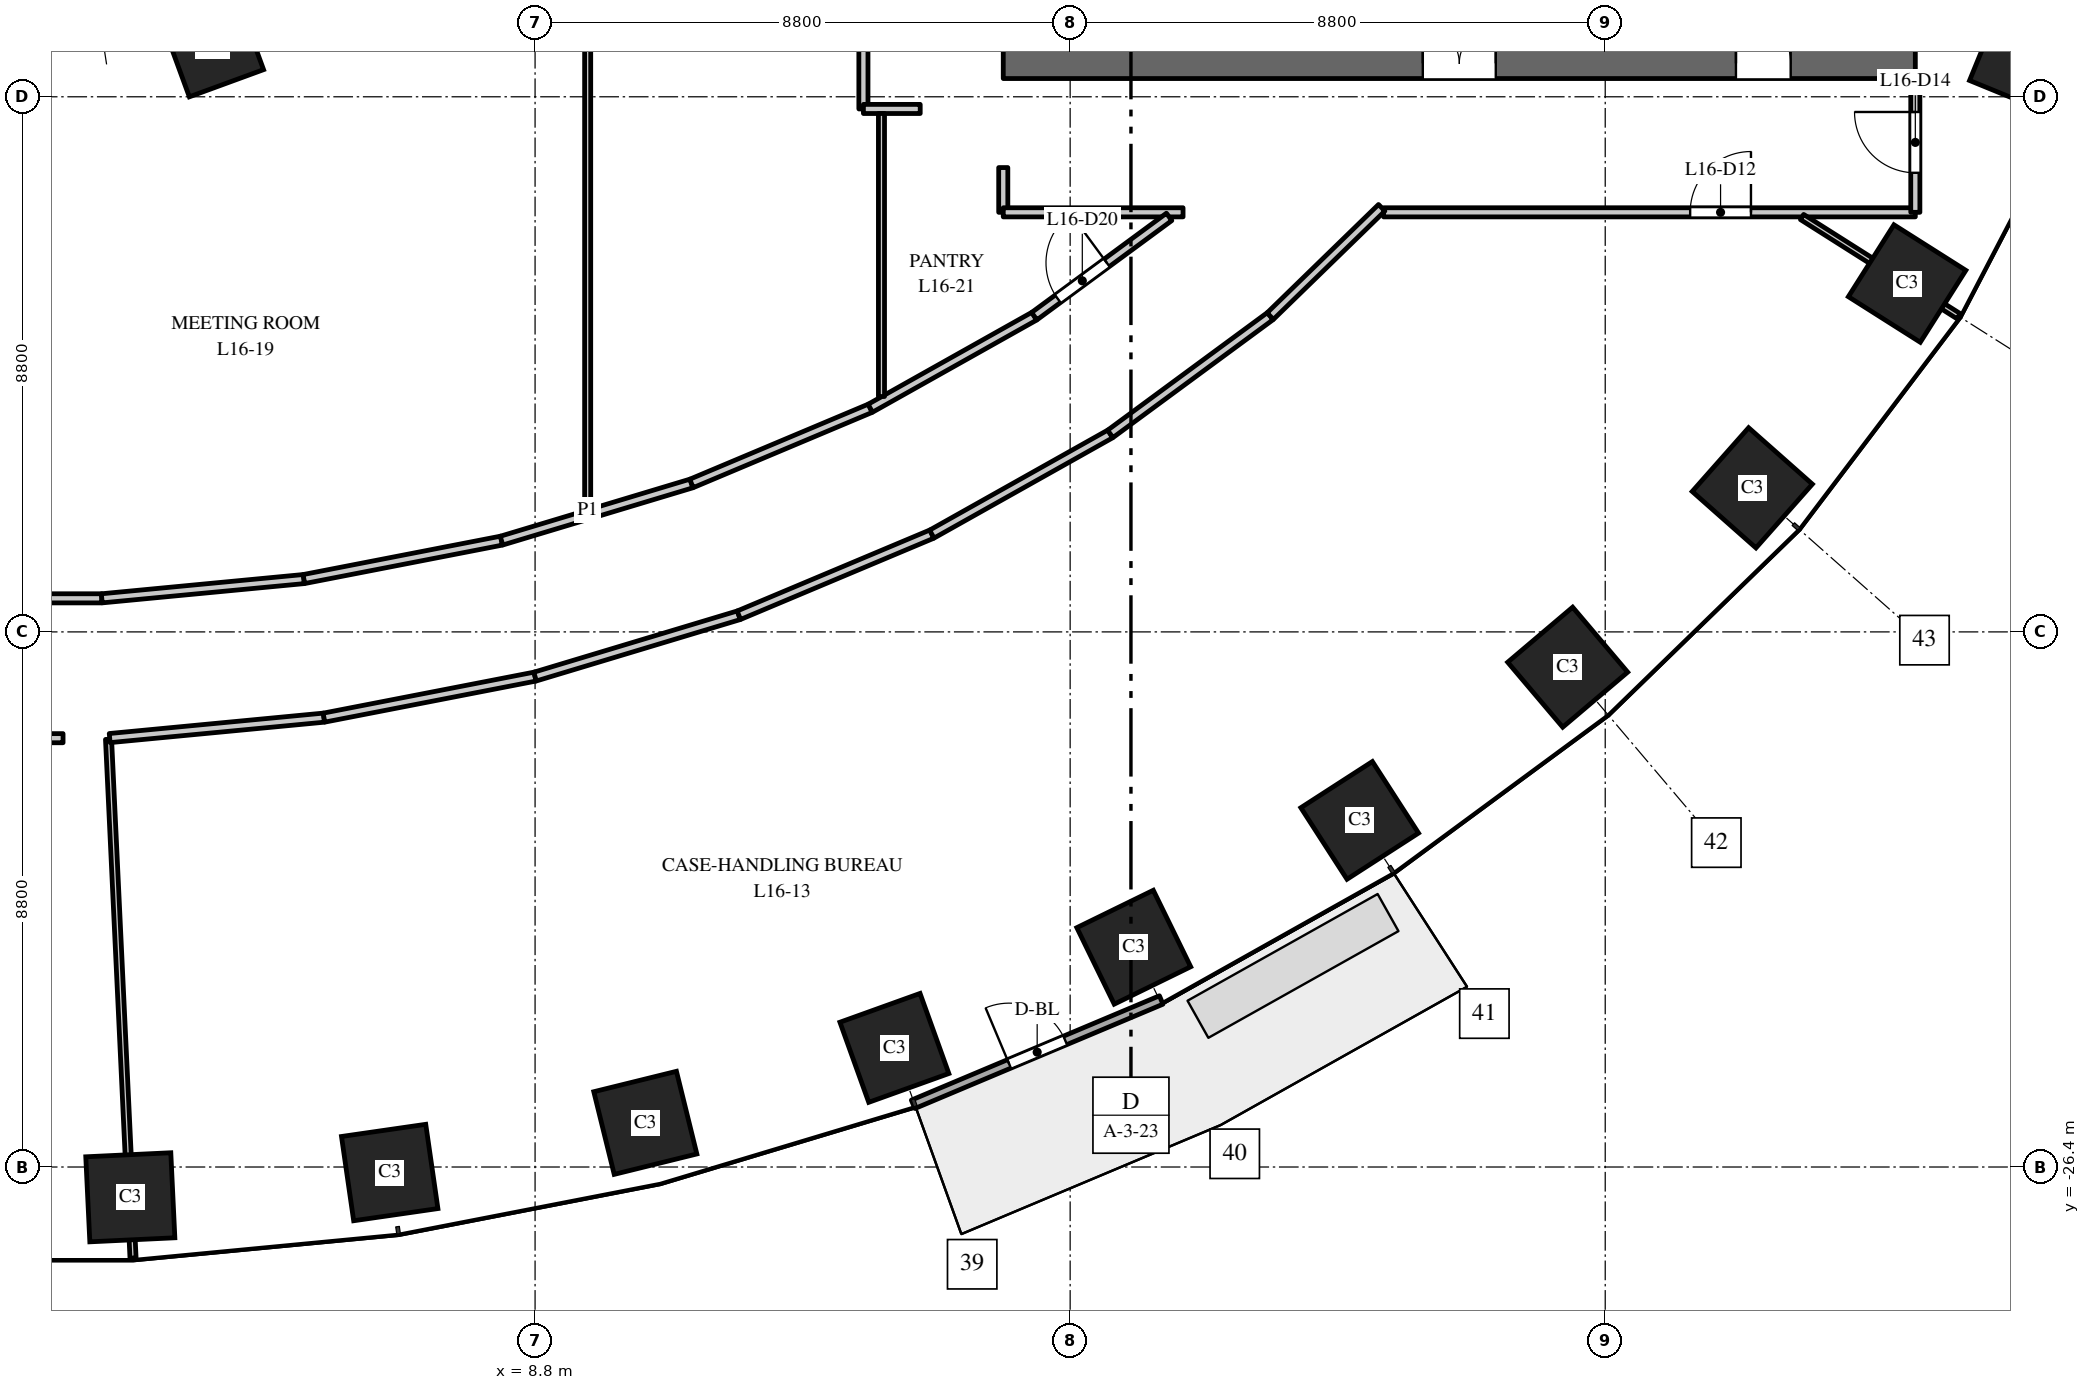
"""IFC4 building model, lengths in metres.
Left out: names, types, materials, properties, quantities, classifications, styles, units other than length and angle.
Written with IfcOpenShell. Run it as: python <this file> out.ifc"""

import sys

from ifc_helpers import new_model, si_unit, direction, frame, frame_2d, origin, origin_2d, place, context, subcontext, project, spatial, rectangle, extrude, element, fill, save


model = new_model("IFC4")
c1 = context("Model", 3, precision=1e-05, world=origin(), true_north=direction((0.0, 1.0)))
c2 = subcontext(c1, "Body", "Model", "MODEL_VIEW")
j1 = project(units=[si_unit("LENGTHUNIT", "METRE"), si_unit("PLANEANGLEUNIT", "RADIAN")], contexts=[c1])
p1 = place(None, origin())
s1 = spatial("IfcSite", under=j1, at=p1, CompositionType="ELEMENT")
p2 = place(p1, origin())
s2 = spatial("IfcBuilding", under=s1, at=p2, CompositionType="ELEMENT")
p3 = place(p2, frame((0.0, 0.0, 74.5)))
s3 = spatial("IfcBuildingStorey", under=s2, at=p3, CompositionType="ELEMENT", Elevation=74.5)
for number, where, z_axis, x_axis in (
    (1, (2.143, -26.898, 0.0), (0.0, 0.0, 1.0), (0.999, 0.048, 0.0)),
    (2, (6.409, -26.491, 0.0), (0.0, 0.0, 1.0), (0.99, 0.143, 0.0)),
    (3, (10.613, -25.674, 0.0), (0.0, 0.0, 1.0), (0.971, 0.24, 0.0)),
    (4, (14.709, -24.441, 0.0), (0.0, 0.0, 1.0), (0.941, 0.338, 0.0)),
    (5, (18.646, -22.785, 0.0), (0.0, 0.0, 1.0), (0.898, 0.439, 0.0)),
    (6, (22.362, -20.7, 0.0), (0.0, 0.0, 1.0), (0.84, 0.542, 0.0)),
    (7, (25.783, -18.18, 0.0), (0.0, 0.0, 1.0), (0.763, 0.646, 0.0)),
    (8, (28.819, -15.23, 0.0), (0.0, 0.0, 1.0), (0.663, 0.749, 0.0)),
    (9, (31.365, -11.871, 0.0), (0.0, 0.0, 1.0), (0.535, 0.845, 0.0)),
    (10, (33.305, -8.149, 0.0), (0.0, 0.0, 1.0), (0.379, 0.925, 0.0)),
):
    element("IfcColumn", number, at=place(p3, frame(where, z_axis=z_axis, x_axis=x_axis)), inside=s3, PredefinedType="COLUMN", context=c2, shape_type="SweptSolid", body=[
        extrude(rectangle(XDim=1.4, YDim=1.4, at=origin_2d()), origin(), (0.0, 0.0, 1.0), 4.0),
    ])
p4 = place(p3, frame((3.501, -7.967, 0.0), z_axis=(0.0, 0.0, 1.0), x_axis=(0.939019578916, 0.343863679984, 0.0)))
e11 = element("IfcColumn", 11, at=p4, inside=s3, PredefinedType="COLUMN", context=c2, shape_type="SweptSolid", body=[
    extrude(rectangle(XDim=1.3, YDim=1.3, at=origin_2d()), origin(), (0.0, 0.0, 1.0), 4.0),
])
p5 = place(p3, frame((16.5, -8.25, 0.0), z_axis=(0.0, 0.0, 1.0), x_axis=(1.0, 0.0, 0.0)))
e12 = element("IfcWall", 12, at=p5, inside=s3, PredefinedType="SHEAR", context=c2, shape_type="SweptSolid", body=[
    extrude(rectangle(XDim=15.0, YDim=0.5, at=frame_2d((7.5, 0.0))), origin(), (0.0, 0.0, 1.0), 3.7),
])
p6 = place(p5, frame((6.9, 0.0, 0.0)))
e13 = element("IfcOpeningElement", 13, at=p6, cuts=e12, PredefinedType="OPENING", context=c2, shape_type="SweptSolid", body=[
    extrude(rectangle(XDim=1.2, YDim=2.1, at=frame_2d((0.6, 1.05))), frame((0.0, 0.26, 0.0), z_axis=(0.0, -1.0, 0.0), x_axis=(1.0, 0.0, 0.0)), (0.0, 0.0, 1.0), 0.52),
])
p7 = place(p5, frame((12.05, 0.0, 0.0)))
e14 = element("IfcOpeningElement", 14, at=p7, cuts=e12, PredefinedType="OPENING", context=c2, shape_type="SweptSolid", body=[
    extrude(rectangle(XDim=0.9, YDim=2.1, at=frame_2d((0.45, 1.05))), frame((0.0, 0.26, 0.0), z_axis=(0.0, -1.0, 0.0), x_axis=(1.0, 0.0, 0.0)), (0.0, 0.0, 1.0), 0.52),
])
p8 = place(p3, frame((15.018, -25.369, 0.0), z_axis=(0.0, 0.0, 1.0), x_axis=(0.921816985161, 0.387625393736, 0.0)))
e15 = element("IfcWall", 15, at=p8, inside=s3, PredefinedType="STANDARD", context=c2, shape_type="SweptSolid", body=[
    extrude(rectangle(XDim=4.426, YDim=0.15, at=frame_2d((2.213, 0.0))), origin(), (0.0, 0.0, 1.0), 3.7),
])
p9 = place(p8, frame((1.713, 0.0, 0.0)))
e16 = element("IfcOpeningElement", 16, at=p9, cuts=e15, PredefinedType="OPENING", context=c2, shape_type="SweptSolid", body=[
    extrude(rectangle(XDim=1.0, YDim=2.4, at=frame_2d((0.5, 1.2))), frame((0.0, 0.085, 0.0), z_axis=(0.0, -1.0, 0.0), x_axis=(1.0, 0.0, 0.0)), (0.0, 0.0, 1.0), 0.17),
])
p10 = place(p3, frame((-1.784, -19.348, 0.0), z_axis=(0.0, 0.0, 1.0), x_axis=(1.0, 0.0, 0.0)))
e17 = element("IfcWall", 17, at=p10, inside=s3, PredefinedType="PARTITIONING", context=c2, shape_type="SweptSolid", body=[
    extrude(rectangle(XDim=2.821, YDim=0.15, at=frame_2d((1.411, 0.0))), origin(), (0.0, 0.0, 1.0), 2.85),
])
p11 = place(p3, frame((0.0, -17.048, 0.0), z_axis=(0.0, 0.0, 1.0), x_axis=(1.0, 0.0, 0.0)))
e18 = element("IfcWall", 18, at=p11, inside=s3, PredefinedType="PARTITIONING", context=c2, shape_type="SweptSolid", body=[
    extrude(rectangle(XDim=1.674, YDim=0.15, at=frame_2d((0.837, 0.0))), origin(), (0.0, 0.0, 1.0), 3.7),
])
p12 = place(p3, frame((1.674, -17.048, 0.0), z_axis=(0.0, 0.0, 1.0), x_axis=(0.995479356205, 0.094978162593, 0.0)))
e19 = element("IfcWall", 19, at=p12, inside=s3, PredefinedType="PARTITIONING", context=c2, shape_type="SweptSolid", body=[
    extrude(rectangle(XDim=3.339, YDim=0.15, at=frame_2d((1.669, 0.0))), origin(), (0.0, 0.0, 1.0), 2.85),
])
p13 = place(p3, frame((1.785, -19.366, 0.0), z_axis=(0.0, 0.0, 1.0), x_axis=(0.047190335266, -0.998885915537, 0.0)))
e20 = element("IfcWall", 20, at=p13, inside=s3, PredefinedType="PARTITIONING", context=c2, shape_type="SweptSolid", body=[
    extrude(rectangle(XDim=8.542, YDim=0.1, at=frame_2d((4.271, 0.0))), origin(), (0.0, 0.0, 1.0), 2.85),
])
p14 = place(p3, frame((1.804, -19.346, 0.0), z_axis=(0.0, 0.0, 1.0), x_axis=(0.99548678928, 0.094900223226, 0.0)))
e21 = element("IfcWall", 21, at=p14, inside=s3, PredefinedType="PARTITIONING", context=c2, shape_type="SweptSolid", body=[
    extrude(rectangle(XDim=3.54, YDim=0.15, at=frame_2d((1.77, 0.0))), origin(), (0.0, 0.0, 1.0), 2.85),
])
p15 = place(p3, frame((4.998, -16.731, 0.0), z_axis=(0.0, 0.0, 1.0), x_axis=(0.981621529558, 0.190838079815, 0.0)))
e22 = element("IfcWall", 22, at=p15, inside=s3, PredefinedType="PARTITIONING", context=c2, shape_type="SweptSolid", body=[
    extrude(rectangle(XDim=3.311, YDim=0.15, at=frame_2d((1.655, 0.0))), origin(), (0.0, 0.0, 1.0), 3.7),
])
p16 = place(p3, frame((5.328, -19.01, 0.0), z_axis=(0.0, 0.0, 1.0), x_axis=(0.981620418387, 0.190843795306, 0.0)))
e23 = element("IfcWall", 23, at=p16, inside=s3, PredefinedType="PARTITIONING", context=c2, shape_type="SweptSolid", body=[
    extrude(rectangle(XDim=3.537, YDim=0.15, at=frame_2d((1.769, 0.0))), origin(), (0.0, 0.0, 1.0), 3.7),
])
p17 = place(p3, frame((8.248, -16.099, 0.0), z_axis=(0.0, 0.0, 1.0), x_axis=(0.95757464185, 0.28818536619, 0.0)))
e24 = element("IfcWall", 24, at=p17, inside=s3, PredefinedType="PARTITIONING", context=c2, shape_type="SweptSolid", body=[
    extrude(rectangle(XDim=3.262, YDim=0.15, at=frame_2d((1.631, 0.0))), origin(), (0.0, 0.0, 1.0), 2.85),
])
p18 = place(p3, frame((8.8, -18.335, 0.0), z_axis=(0.0, 0.0, 1.0), x_axis=(0.957528149021, 0.288339806186, 0.0)))
e25 = element("IfcWall", 25, at=p18, inside=s3, PredefinedType="PARTITIONING", context=c2, shape_type="SweptSolid", body=[
    extrude(rectangle(XDim=3.5, YDim=0.15, at=frame_2d((1.75, 0.0))), origin(), (0.0, 0.0, 1.0), 2.85),
])
p19 = place(p3, frame((9.665, -15.591, 0.0), z_axis=(0.0, 0.0, 1.0), x_axis=(0.0, 1.0, 0.0)))
e26 = element("IfcWall", 26, at=p19, inside=s3, PredefinedType="PARTITIONING", context=c2, shape_type="SweptSolid", body=[
    extrude(rectangle(XDim=31.182, YDim=0.1, at=frame_2d((15.591, 0.0))), origin(), (0.0, 0.0, 1.0), 2.75),
])
p20 = place(p3, frame((11.372, -15.159, 0.0), z_axis=(0.0, 0.0, 1.0), x_axis=(0.921799502591, 0.387666966638, 0.0)))
e27 = element("IfcWall", 27, at=p20, inside=s3, PredefinedType="PARTITIONING", context=c2, shape_type="SweptSolid", body=[
    extrude(rectangle(XDim=3.19, YDim=0.15, at=frame_2d((1.595, 0.0))), origin(), (0.0, 0.0, 1.0), 3.7),
])
p21 = place(p3, frame((12.151, -17.326, 0.0), z_axis=(0.0, 0.0, 1.0), x_axis=(0.921891448612, 0.387448263612, 0.0)))
e28 = element("IfcWall", 28, at=p21, inside=s3, PredefinedType="PARTITIONING", context=c2, shape_type="SweptSolid", body=[
    extrude(rectangle(XDim=3.443, YDim=0.15, at=frame_2d((1.722, 0.0))), origin(), (0.0, 0.0, 1.0), 3.7),
])
p22 = place(p3, frame((14.2, -9.0, 0.0), z_axis=(0.0, 0.0, 1.0), x_axis=(0.0, 1.0, 0.0)))
e29 = element("IfcWall", 29, at=p22, inside=s3, PredefinedType="PARTITIONING", context=c2, shape_type="SweptSolid", body=[
    extrude(rectangle(XDim=18.0, YDim=0.15, at=frame_2d((9.0, 0.0))), origin(), (0.0, 0.0, 1.0), 2.75),
])
p23 = place(p22, frame((16.35, 0.0, 0.0)))
e30 = element("IfcOpeningElement", 30, at=p23, cuts=e29, PredefinedType="OPENING", context=c2, shape_type="SweptSolid", body=[
    extrude(rectangle(XDim=1.0, YDim=2.1, at=frame_2d((0.5, 1.05))), frame((0.0, 0.085, 0.0), z_axis=(0.0, -1.0, 0.0), x_axis=(1.0, 0.0, 0.0)), (0.0, 0.0, 1.0), 0.17),
])
p24 = place(p3, frame((14.2, -9.0, 0.0), z_axis=(0.0, 0.0, 1.0), x_axis=(1.0, 0.0, 0.0)))
e31 = element("IfcWall", 31, at=p24, inside=s3, PredefinedType="PARTITIONING", context=c2, shape_type="SweptSolid", body=[
    extrude(rectangle(XDim=0.934, YDim=0.15, at=frame_2d((0.467, 0.0))), origin(), (0.0, 0.0, 1.0), 3.7),
])
p25 = place(p3, frame((14.313, -13.922, 0.0), z_axis=(0.0, 0.0, 1.0), x_axis=(0.871977874087, 0.489545286059, 0.0)))
e32 = element("IfcWall", 32, at=p25, inside=s3, PredefinedType="PARTITIONING", context=c2, shape_type="SweptSolid", body=[
    extrude(rectangle(XDim=3.093, YDim=0.15, at=frame_2d((1.546, 0.0))), origin(), (0.0, 0.0, 1.0), 3.7),
])
p26 = place(p3, frame((14.497, -13.729, 0.0), z_axis=(0.0, 0.0, 1.0), x_axis=(0.0, 1.0, 0.0)))
e33 = element("IfcWall", 33, at=p26, inside=s3, PredefinedType="PARTITIONING", context=c2, shape_type="SweptSolid", body=[
    extrude(rectangle(XDim=4.654, YDim=0.1, at=frame_2d((2.327, 0.0))), origin(), (0.0, 0.0, 1.0), 3.7),
])
p27 = place(p3, frame((15.325, -15.992, 0.0), z_axis=(0.0, 0.0, 1.0), x_axis=(0.871958798398, 0.489579262118, 0.0)))
e34 = element("IfcWall", 34, at=p27, inside=s3, PredefinedType="PARTITIONING", context=c2, shape_type="SweptSolid", body=[
    extrude(rectangle(XDim=3.366, YDim=0.15, at=frame_2d((1.683, 0.0))), origin(), (0.0, 0.0, 1.0), 3.7),
])
p28 = place(p3, frame((16.5, -10.7, 0.0), z_axis=(0.0, 0.0, 1.0), x_axis=(0.0, 1.0, 0.0)))
e35 = element("IfcWall", 35, at=p28, inside=s3, PredefinedType="PARTITIONING", context=c2, shape_type="SweptSolid", body=[
    extrude(rectangle(XDim=0.736, YDim=0.15, at=frame_2d((0.368, 0.0))), origin(), (0.0, 0.0, 1.0), 3.7),
])
p29 = place(p3, frame((16.5, -10.7, 0.0), z_axis=(0.0, 0.0, 1.0), x_axis=(1.0, 0.0, 0.0)))
e36 = element("IfcWall", 36, at=p29, inside=s3, PredefinedType="PARTITIONING", context=c2, shape_type="SweptSolid", body=[
    extrude(rectangle(XDim=2.957, YDim=0.15, at=frame_2d((1.479, 0.0))), origin(), (0.0, 0.0, 1.0), 3.7),
])
p30 = place(p3, frame((17.01, -12.408, 0.0), z_axis=(0.0, 0.0, 1.0), x_axis=(0.805276342361, 0.592899664728, 0.0)))
e37 = element("IfcWall", 37, at=p30, inside=s3, PredefinedType="PARTITIONING", context=c2, shape_type="SweptSolid", body=[
    extrude(rectangle(XDim=2.754, YDim=0.15, at=frame_2d((1.377, 0.0))), origin(), (0.0, 0.0, 1.0), 3.7),
])
p31 = place(p30, frame((0.481, 0.0, 0.0)))
e38 = element("IfcOpeningElement", 38, at=p31, cuts=e37, PredefinedType="OPENING", context=c2, shape_type="SweptSolid", body=[
    extrude(rectangle(XDim=1.0, YDim=2.1, at=frame_2d((0.5, 1.05))), frame((0.0, 0.085, 0.0), z_axis=(0.0, -1.0, 0.0), x_axis=(1.0, 0.0, 0.0)), (0.0, 0.0, 1.0), 0.17),
])
p32 = place(p3, frame((18.26, -14.344, 0.0), z_axis=(0.0, 0.0, 1.0), x_axis=(0.805303685339, 0.592862525701, 0.0)))
e39 = element("IfcWall", 39, at=p32, inside=s3, PredefinedType="PARTITIONING", context=c2, shape_type="SweptSolid", body=[
    extrude(rectangle(XDim=3.267, YDim=0.15, at=frame_2d((1.634, 0.0))), origin(), (0.0, 0.0, 1.0), 3.7),
])
p33 = place(p3, frame((20.891, -12.407, 0.0), z_axis=(0.0, 0.0, 1.0), x_axis=(0.71701613235, 0.697056572991, 0.0)))
e40 = element("IfcWall", 40, at=p33, inside=s3, PredefinedType="PARTITIONING", context=c2, shape_type="SweptSolid", body=[
    extrude(rectangle(XDim=2.556, YDim=0.15, at=frame_2d((1.278, 0.0))), origin(), (0.0, 0.0, 1.0), 2.75),
])
p34 = place(p3, frame((22.755, -10.7, 0.0), z_axis=(0.0, 0.0, 1.0), x_axis=(1.0, 0.0, 0.0)))
e41 = element("IfcWall", 41, at=p34, inside=s3, PredefinedType="PARTITIONING", context=c2, shape_type="SweptSolid", body=[
    extrude(rectangle(XDim=8.745, YDim=0.15, at=frame_2d((4.373, 0.0))), origin(), (0.0, 0.0, 1.0), 2.85),
])
p35 = place(p34, frame((5.042, 0.0, 0.0)))
e42 = element("IfcOpeningElement", 42, at=p35, cuts=e41, PredefinedType="OPENING", context=c2, shape_type="SweptSolid", body=[
    extrude(rectangle(XDim=1.0, YDim=2.1, at=frame_2d((0.5, 1.05))), frame((0.0, 0.085, 0.0), z_axis=(0.0, -1.0, 0.0), x_axis=(1.0, 0.0, 0.0)), (0.0, 0.0, 1.0), 0.17),
])
p36 = place(p3, frame((29.637, -10.777, 0.0), z_axis=(0.0, 0.0, 1.0), x_axis=(0.844810627195, -0.535065420467, 0.0)))
e43 = element("IfcWall", 43, at=p36, inside=s3, PredefinedType="PARTITIONING", context=c2, shape_type="SweptSolid", body=[
    extrude(rectangle(XDim=3.048, YDim=0.1, at=frame_2d((1.524, 0.0))), origin(), (0.0, 0.0, 1.0), 2.85),
])
p37 = place(p3, frame((31.5, -10.7, 0.0), z_axis=(0.0, 0.0, 1.0), x_axis=(0.0, 1.0, 0.0)))
e44 = element("IfcWall", 44, at=p37, inside=s3, PredefinedType="PARTITIONING", context=c2, shape_type="SweptSolid", body=[
    extrude(rectangle(XDim=2.2, YDim=0.15, at=frame_2d((1.1, 0.0))), origin(), (0.0, 0.0, 1.0), 2.85),
])
p38 = place(p37, frame((0.65, 0.0, 0.0)))
e45 = element("IfcOpeningElement", 45, at=p38, cuts=e44, PredefinedType="OPENING", context=c2, shape_type="SweptSolid", body=[
    extrude(rectangle(XDim=1.0, YDim=2.1, at=frame_2d((0.5, 1.05))), frame((0.0, 0.085, 0.0), z_axis=(0.0, -1.0, 0.0), x_axis=(1.0, 0.0, 0.0)), (0.0, 0.0, 1.0), 0.17),
])
p39 = place(p6, origin())
e46 = element("IfcDoor", 46, at=p39, inside=s3, OperationType="DOUBLE_DOOR_DOUBLE_SWING", PredefinedType="DOOR", context=c2, shape_type="SweptSolid", body=[
    extrude(rectangle(XDim=1.2, YDim=2.1, at=frame_2d((0.6, 1.05))), frame((0.0, 0.025, 0.0), z_axis=(0.0, -1.0, 0.0), x_axis=(1.0, 0.0, 0.0)), (0.0, 0.0, 1.0), 0.05),
])
fill(e13, e46)
p40 = place(p7, origin())
e47 = element("IfcDoor", 47, at=p40, inside=s3, OperationType="SINGLE_SWING_RIGHT", PredefinedType="DOOR", context=c2, shape_type="SweptSolid", body=[
    extrude(rectangle(XDim=0.9, YDim=2.1, at=frame_2d((0.45, 1.05))), frame((0.0, 0.025, 0.0), z_axis=(0.0, -1.0, 0.0), x_axis=(1.0, 0.0, 0.0)), (0.0, 0.0, 1.0), 0.05),
])
fill(e14, e47)
p41 = place(p9, origin())
e48 = element("IfcDoor", 48, at=p41, inside=s3, OperationType="SINGLE_SWING_LEFT", PredefinedType="DOOR", context=c2, shape_type="SweptSolid", body=[
    extrude(rectangle(XDim=1.0, YDim=2.4, at=frame_2d((0.5, 1.2))), frame((0.0, 0.025, 0.0), z_axis=(0.0, -1.0, 0.0), x_axis=(1.0, 0.0, 0.0)), (0.0, 0.0, 1.0), 0.05),
])
fill(e16, e48)
p42 = place(p35, origin())
e49 = element("IfcDoor", 49, at=p42, inside=s3, OperationType="SINGLE_SWING_RIGHT", PredefinedType="DOOR", context=c2, shape_type="SweptSolid", body=[
    extrude(rectangle(XDim=1.0, YDim=2.1, at=frame_2d((0.5, 1.05))), frame((0.0, 0.025, 0.0), z_axis=(0.0, -1.0, 0.0), x_axis=(1.0, 0.0, 0.0)), (0.0, 0.0, 1.0), 0.05),
])
fill(e42, e49)
p43 = place(p38, origin())
e50 = element("IfcDoor", 50, at=p43, inside=s3, OperationType="SINGLE_SWING_RIGHT", PredefinedType="DOOR", context=c2, shape_type="SweptSolid", body=[
    extrude(rectangle(XDim=1.0, YDim=2.1, at=frame_2d((0.5, 1.05))), frame((0.0, 0.025, 0.0), z_axis=(0.0, -1.0, 0.0), x_axis=(1.0, 0.0, 0.0)), (0.0, 0.0, 1.0), 0.05),
])
fill(e45, e50)
p44 = place(p31, origin())
e51 = element("IfcDoor", 51, at=p44, inside=s3, OperationType="SINGLE_SWING_RIGHT", PredefinedType="DOOR", context=c2, shape_type="SweptSolid", body=[
    extrude(rectangle(XDim=1.0, YDim=2.1, at=frame_2d((0.5, 1.05))), frame((0.0, 0.025, 0.0), z_axis=(0.0, -1.0, 0.0), x_axis=(1.0, 0.0, 0.0)), (0.0, 0.0, 1.0), 0.05),
])
fill(e38, e51)
save(model, sys.argv[1])
